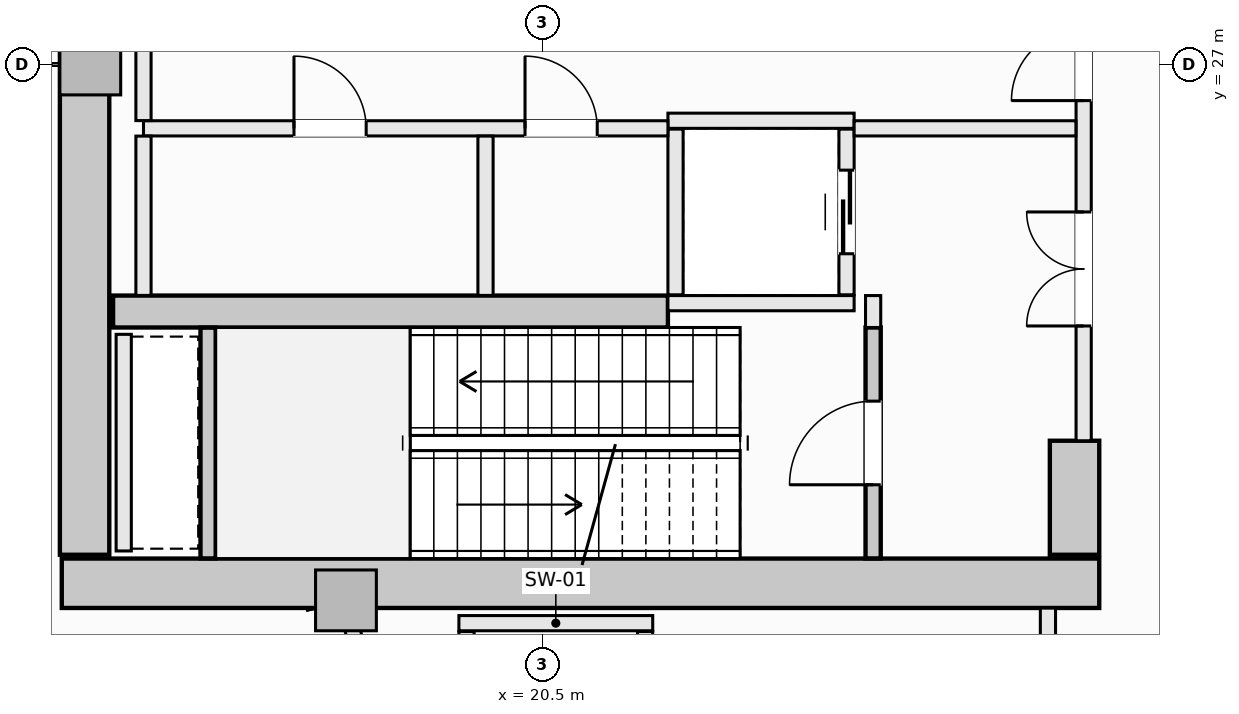
"""IFC4 building model, lengths in metres.
Left out: names, types, materials, properties, quantities, classifications, styles, units other than length and angle.
Written with IfcOpenShell. Run it as: python <this file> out.ifc"""

import sys

from ifc_helpers import new_model, si_unit, direction, frame, frame_2d, origin, origin_2d, place, context, subcontext, project, spatial, rectangle, extrude, element, fill, save


model = new_model("IFC4")
c1 = context("Model", 3, precision=1e-05, world=origin(), true_north=direction((0.0, 1.0)))
c2 = subcontext(c1, "Body", "Model", "MODEL_VIEW")
j1 = project(units=[si_unit("LENGTHUNIT", "METRE"), si_unit("PLANEANGLEUNIT", "RADIAN")], contexts=[c1])
p1 = place(None, origin())
s1 = spatial("IfcSite", under=j1, at=p1, CompositionType="ELEMENT")
p2 = place(p1, origin())
s2 = spatial("IfcBuilding", under=s1, at=p2, CompositionType="ELEMENT")
p3 = place(p2, frame((0.0, 0.0, 186.9)))
s3 = spatial("IfcBuildingStorey", under=s2, at=p3, CompositionType="ELEMENT", Elevation=186.9)
p4 = place(p3, frame((14.175, 20.175, -0.32), z_axis=(0.0, 0.0, 1.0), x_axis=(1.0, 0.0, 0.0)))
e1 = element("IfcWall", 1, at=p4, inside=s3, PredefinedType="SHEAR", context=c2, shape_type="SweptSolid", body=[
    extrude(rectangle(XDim=13.65, YDim=0.65, at=frame_2d((6.825, 0.0))), origin(), (0.0, 0.0, 1.0), 5.04),
])
p5 = place(p3, frame((14.475, 20.55, -0.32), z_axis=(0.0, 0.0, 1.0), x_axis=(0.0, 1.0, 0.0)))
e2 = element("IfcWall", 2, at=p5, inside=s3, PredefinedType="SHEAR", context=c2, shape_type="SweptSolid", body=[
    extrude(rectangle(XDim=12.9, YDim=0.65, at=frame_2d((6.45, 0.0))), origin(), (0.0, 0.0, 1.0), 5.04),
])
p6 = place(p3, frame((27.5, 20.55, -0.32), z_axis=(0.0, 0.0, 1.0), x_axis=(0.0, 1.0, 0.0)))
e3 = element("IfcWall", 3, at=p6, inside=s3, PredefinedType="SHEAR", context=c2, shape_type="SweptSolid", body=[
    extrude(rectangle(XDim=1.5, YDim=0.65, at=frame_2d((0.75, 0.0))), origin(), (0.0, 0.0, 1.0), 5.04),
])
p7 = place(p3, frame((14.85, 23.75, -0.32), z_axis=(0.0, 0.0, 1.0), x_axis=(1.0, 0.0, 0.0)))
e4 = element("IfcWall", 4, at=p7, inside=s3, PredefinedType="SHEAR", context=c2, shape_type="SweptSolid", body=[
    extrude(rectangle(XDim=7.3, YDim=0.42, at=frame_2d((3.65, 0.0))), origin(), (0.0, 0.0, 1.0), 5.04),
])
for number, where, z_axis, x_axis in (
    (5, (14.55, 27.0, -0.32), (0.0, 0.0, 1.0), (1.0, 0.0, 0.0)),
    (6, (17.914, 19.95, -0.32), (0.0, 0.0, 1.0), (1.0, 0.0, 0.0)),
):
    element("IfcColumn", number, at=place(p3, frame(where, z_axis=z_axis, x_axis=x_axis)), inside=s3, PredefinedType="PILASTER", context=c2, shape_type="SweptSolid", body=[
        extrude(rectangle(XDim=0.8, YDim=0.8, at=origin_2d()), origin(), (0.0, 0.0, 1.0), 5.04),
    ])
p8 = place(p3, frame((24.85, 20.502, -0.32), z_axis=(0.0, 0.0, 1.0), x_axis=(0.0, 1.0, 0.0)))
e7 = element("IfcWall", 7, at=p8, inside=s3, PredefinedType="SHEAR", context=c2, shape_type="SweptSolid", body=[
    extrude(rectangle(XDim=3.038, YDim=0.2, at=frame_2d((1.519, 0.0))), origin(), (0.0, 0.0, 1.0), 5.04),
])
p9 = place(p8, frame((0.969, 0.0, 0.32)))
e8 = element("IfcOpeningElement", 8, at=p9, cuts=e7, PredefinedType="OPENING", context=c2, shape_type="SweptSolid", body=[
    extrude(rectangle(XDim=1.1, YDim=2.15, at=frame_2d((0.55, 1.075))), frame((0.0, 0.11, 0.0), z_axis=(0.0, -1.0, 0.0), x_axis=(1.0, 0.0, 0.0)), (0.0, 0.0, 1.0), 0.22),
])
p10 = place(p3, frame((16.1, 20.502, -0.32), z_axis=(0.0, 0.0, 1.0), x_axis=(0.0, 1.0, 0.0)))
e9 = element("IfcWall", 9, at=p10, inside=s3, PredefinedType="SHEAR", context=c2, shape_type="SweptSolid", body=[
    extrude(rectangle(XDim=3.036, YDim=0.2, at=frame_2d((1.518, 0.0))), origin(), (0.0, 0.0, 1.0), 5.04),
])
for number, where, z_axis, x_axis in (
    (10, (22.15, 26.26, 0.0), (0.0, 0.0, 1.0), (1.0, 0.0, 0.0)),
    (11, (22.15, 23.86, 0.0), (0.0, 0.0, 1.0), (1.0, 0.0, 0.0)),
):
    element("IfcWall", number, at=place(p3, frame(where, z_axis=z_axis, x_axis=x_axis)), inside=s3, PredefinedType="SOLIDWALL", context=c2, shape_type="SweptSolid", body=[
        extrude(rectangle(XDim=2.45, YDim=0.2, at=frame_2d((1.225, 0.0))), origin(), (0.0, 0.0, 1.0), 4.72),
    ])
p11 = place(p3, frame((22.25, 23.97, 0.0), z_axis=(0.0, 0.0, 1.0), x_axis=(0.0, 1.0, 0.0)))
e12 = element("IfcWall", 12, at=p11, inside=s3, PredefinedType="SOLIDWALL", context=c2, shape_type="SweptSolid", body=[
    extrude(rectangle(XDim=2.18, YDim=0.2, at=frame_2d((1.09, 0.0))), origin(), (0.0, 0.0, 1.0), 4.72),
])
p12 = place(p3, frame((24.5, 23.97, 0.0), z_axis=(0.0, 0.0, 1.0), x_axis=(0.0, 1.0, 0.0)))
e13 = element("IfcWall", 13, at=p12, inside=s3, PredefinedType="SOLIDWALL", context=c2, shape_type="SweptSolid", body=[
    extrude(rectangle(XDim=2.18, YDim=0.2, at=frame_2d((1.09, 0.0))), origin(), (0.0, 0.0, 1.0), 4.72),
])
p13 = place(p12, frame((0.54, 0.0, 0.0)))
e14 = element("IfcOpeningElement", 14, at=p13, cuts=e13, PredefinedType="OPENING", context=c2, shape_type="SweptSolid", body=[
    extrude(rectangle(XDim=1.1, YDim=2.2, at=frame_2d((0.55, 1.1))), frame((0.0, 0.11, 0.0), z_axis=(0.0, -1.0, 0.0), x_axis=(1.0, 0.0, 0.0)), (0.0, 0.0, 1.0), 0.22),
])
p14 = place(p3, frame((19.4, 19.65, 0.0), z_axis=(0.0, 0.0, 1.0), x_axis=(1.0, 0.0, 0.0)))
e15 = element("IfcWall", 15, at=p14, inside=s3, PredefinedType="SOLIDWALL", context=c2, shape_type="SweptSolid", body=[
    extrude(rectangle(XDim=2.55, YDim=0.2, at=frame_2d((1.275, 0.0))), origin(), (0.0, 0.0, 1.0), 4.72),
])
for number, where, z_axis, x_axis in (
    (16, (19.5, 17.01, 0.0), (0.0, 0.0, 1.0), (0.0, 1.0, 0.0)),
    (17, (21.85, 17.01, 0.0), (0.0, 0.0, 1.0), (0.0, 1.0, 0.0)),
):
    element("IfcWall", number, at=place(p3, frame(where, z_axis=z_axis, x_axis=x_axis)), inside=s3, PredefinedType="SOLIDWALL", context=c2, shape_type="SweptSolid", body=[
        extrude(rectangle(XDim=2.53, YDim=0.2, at=frame_2d((1.265, 0.0))), origin(), (0.0, 0.0, 1.0), 4.72),
    ])
p15 = place(p3, frame((14.99, 20.6, 0.0), z_axis=(0.0, 0.0, 1.0), x_axis=(0.0, 1.0, 0.0)))
e18 = element("IfcWall", 18, at=p15, inside=s3, PredefinedType="SOLIDWALL", context=c2, shape_type="SweptSolid", body=[
    extrude(rectangle(XDim=2.85, YDim=0.2, at=frame_2d((1.425, 0.0))), origin(), (0.0, 0.0, 1.0), 4.72),
])
p16 = place(p3, frame((24.85, 23.54, 0.0), z_axis=(0.0, 0.0, 1.0), x_axis=(0.0, 1.0, 0.0)))
e19 = element("IfcWall", 19, at=p16, inside=s3, PredefinedType="SOLIDWALL", context=c2, shape_type="SweptSolid", body=[
    extrude(rectangle(XDim=0.42, YDim=0.2, at=frame_2d((0.21, 0.0))), origin(), (0.0, 0.0, 1.0), 4.72),
])
p17 = place(p3, frame((27.62, 22.05, 0.0), z_axis=(0.0, 0.0, 1.0), x_axis=(0.0, 1.0, 0.0)))
e20 = element("IfcWall", 20, at=p17, inside=s3, PredefinedType="SOLIDWALL", context=c2, shape_type="SweptSolid", body=[
    extrude(rectangle(XDim=9.9, YDim=0.2, at=frame_2d((4.95, 0.0))), origin(), (0.0, 0.0, 1.0), 3.812),
])
p18 = place(p17, frame((4.475, 0.0, 0.0)))
e21 = element("IfcOpeningElement", 21, at=p18, cuts=e20, PredefinedType="OPENING", context=c2, shape_type="SweptSolid", body=[
    extrude(rectangle(XDim=0.95, YDim=2.1, at=frame_2d((0.475, 1.05))), frame((0.0, 0.11, 0.0), z_axis=(0.0, -1.0, 0.0), x_axis=(1.0, 0.0, 0.0)), (0.0, 0.0, 1.0), 0.22),
])
p19 = place(p17, frame((6.89, 0.0, 0.0)))
e22 = element("IfcOpeningElement", 22, at=p19, cuts=e20, PredefinedType="OPENING", context=c2, shape_type="SweptSolid", body=[
    extrude(rectangle(XDim=1.5, YDim=2.2, at=frame_2d((0.75, 1.1))), frame((0.0, 0.11, 0.0), z_axis=(0.0, -1.0, 0.0), x_axis=(1.0, 0.0, 0.0)), (0.0, 0.0, 1.0), 0.22),
])
p20 = place(p17, frame((1.51, 0.0, 0.0)))
e23 = element("IfcOpeningElement", 23, at=p20, cuts=e20, PredefinedType="OPENING", context=c2, shape_type="SweptSolid", body=[
    extrude(rectangle(XDim=1.5, YDim=2.2, at=frame_2d((0.75, 1.1))), frame((0.0, 0.11, 0.0), z_axis=(0.0, -1.0, 0.0), x_axis=(1.0, 0.0, 0.0)), (0.0, 0.0, 1.0), 0.22),
])
p21 = place(p3, frame((15.25, 26.16, 0.0), z_axis=(0.0, 0.0, 1.0), x_axis=(1.0, 0.0, 0.0)))
e24 = element("IfcWall", 24, at=p21, inside=s3, PredefinedType="SOLIDWALL", context=c2, shape_type="SweptSolid", body=[
    extrude(rectangle(XDim=6.9, YDim=0.2, at=frame_2d((3.45, 0.0))), origin(), (0.0, 0.0, 1.0), 4.72),
])
p22 = place(p21, frame((5.02, 0.0, 0.0)))
e25 = element("IfcOpeningElement", 25, at=p22, cuts=e24, PredefinedType="OPENING", context=c2, shape_type="SweptSolid", body=[
    extrude(rectangle(XDim=0.95, YDim=2.1, at=frame_2d((0.475, 1.05))), frame((0.0, 0.11, 0.0), z_axis=(0.0, -1.0, 0.0), x_axis=(1.0, 0.0, 0.0)), (0.0, 0.0, 1.0), 0.22),
])
p23 = place(p21, frame((1.98, 0.0, 0.0)))
e26 = element("IfcOpeningElement", 26, at=p23, cuts=e24, PredefinedType="OPENING", context=c2, shape_type="SweptSolid", body=[
    extrude(rectangle(XDim=0.95, YDim=2.1, at=frame_2d((0.475, 1.05))), frame((0.0, 0.11, 0.0), z_axis=(0.0, -1.0, 0.0), x_axis=(1.0, 0.0, 0.0)), (0.0, 0.0, 1.0), 0.22),
])
p24 = place(p3, frame((24.6, 26.16, 0.0), z_axis=(0.0, 0.0, 1.0), x_axis=(1.0, 0.0, 0.0)))
e27 = element("IfcWall", 27, at=p24, inside=s3, PredefinedType="SOLIDWALL", context=c2, shape_type="SweptSolid", body=[
    extrude(rectangle(XDim=2.918, YDim=0.2, at=frame_2d((1.459, 0.0))), origin(), (0.0, 0.0, 1.0), 4.72),
])
p25 = place(p3, frame((15.25, 23.962, 0.0), z_axis=(0.0, 0.0, 1.0), x_axis=(0.0, 1.0, 0.0)))
e28 = element("IfcWall", 28, at=p25, inside=s3, PredefinedType="SOLIDWALL", context=c2, shape_type="SweptSolid", body=[
    extrude(rectangle(XDim=2.096, YDim=0.2, at=frame_2d((1.048, 0.0))), origin(), (0.0, 0.0, 1.0), 4.72),
])
p26 = place(p3, frame((15.25, 26.262, 0.0), z_axis=(0.0, 0.0, 1.0), x_axis=(0.0, 1.0, 0.0)))
e29 = element("IfcWall", 29, at=p26, inside=s3, PredefinedType="SOLIDWALL", context=c2, shape_type="SweptSolid", body=[
    extrude(rectangle(XDim=1.476, YDim=0.2, at=frame_2d((0.738, 0.0))), origin(), (0.0, 0.0, 1.0), 4.72),
])
p27 = place(p3, frame((19.75, 23.962, 0.0), z_axis=(0.0, 0.0, 1.0), x_axis=(0.0, 1.0, 0.0)))
e30 = element("IfcWall", 30, at=p27, inside=s3, PredefinedType="SOLIDWALL", context=c2, shape_type="SweptSolid", body=[
    extrude(rectangle(XDim=2.096, YDim=0.2, at=frame_2d((1.048, 0.0))), origin(), (0.0, 0.0, 1.0), 4.72),
])
p28 = place(p3, frame((27.15, 14.8, 0.0), z_axis=(0.0, 0.0, 1.0), x_axis=(0.0, 1.0, 0.0)))
e31 = element("IfcWall", 31, at=p28, inside=s3, PredefinedType="SOLIDWALL", context=c2, shape_type="SweptSolid", body=[
    extrude(rectangle(XDim=5.048, YDim=0.2, at=frame_2d((2.524, 0.0))), origin(), (0.0, 0.0, 1.0), 4.72),
])
p29 = place(p3, frame((17.937, 19.848, 0.0), z_axis=(0.0, 0.0, 1.0), x_axis=(0.221752397237, -0.97510300703, 0.0)))
e32 = element("IfcWall", 32, at=p29, inside=s3, PredefinedType="SOLIDWALL", context=c2, shape_type="SweptSolid", body=[
    extrude(rectangle(XDim=1.045, YDim=0.2, at=frame_2d((0.522, 0.0))), origin(), (0.0, 0.0, 1.0), 4.095),
])
p30 = place(p9, origin())
e33 = element("IfcDoor", 33, at=p30, inside=s3, OperationType="SINGLE_SWING_LEFT", PredefinedType="DOOR", context=c2, shape_type="SweptSolid", body=[
    extrude(rectangle(XDim=1.1, YDim=2.15, at=frame_2d((0.55, 1.075))), frame((0.0, 0.025, 0.0), z_axis=(0.0, -1.0, 0.0), x_axis=(1.0, 0.0, 0.0)), (0.0, 0.0, 1.0), 0.05),
])
fill(e8, e33)
p31 = place(p13, origin())
e34 = element("IfcDoor", 34, at=p31, inside=s3, OperationType="SLIDING_TO_LEFT", PredefinedType="DOOR", context=c2, shape_type="SweptSolid", body=[
    extrude(rectangle(XDim=1.1, YDim=2.2, at=frame_2d((0.55, 1.1))), frame((0.0, 0.025, 0.0), z_axis=(0.0, -1.0, 0.0), x_axis=(1.0, 0.0, 0.0)), (0.0, 0.0, 1.0), 0.05),
])
fill(e14, e34)
p32 = place(p18, origin())
e35 = element("IfcDoor", 35, at=p32, inside=s3, OperationType="SINGLE_SWING_LEFT", PredefinedType="DOOR", context=c2, shape_type="SweptSolid", body=[
    extrude(rectangle(XDim=0.95, YDim=2.1, at=frame_2d((0.475, 1.05))), frame((0.0, 0.025, 0.0), z_axis=(0.0, -1.0, 0.0), x_axis=(1.0, 0.0, 0.0)), (0.0, 0.0, 1.0), 0.05),
])
fill(e21, e35)
p33 = place(p20, origin())
e36 = element("IfcDoor", 36, at=p33, inside=s3, OperationType="DOUBLE_DOOR_SINGLE_SWING", PredefinedType="DOOR", context=c2, shape_type="SweptSolid", body=[
    extrude(rectangle(XDim=1.5, YDim=2.2, at=frame_2d((0.75, 1.1))), frame((0.0, 0.025, 0.0), z_axis=(0.0, -1.0, 0.0), x_axis=(1.0, 0.0, 0.0)), (0.0, 0.0, 1.0), 0.05),
])
fill(e23, e36)
p34 = place(p22, origin())
e37 = element("IfcDoor", 37, at=p34, inside=s3, OperationType="SINGLE_SWING_LEFT", PredefinedType="DOOR", context=c2, shape_type="SweptSolid", body=[
    extrude(rectangle(XDim=0.95, YDim=2.1, at=frame_2d((0.475, 1.05))), frame((0.0, 0.025, 0.0), z_axis=(0.0, -1.0, 0.0), x_axis=(1.0, 0.0, 0.0)), (0.0, 0.0, 1.0), 0.05),
])
fill(e25, e37)
p35 = place(p23, origin())
e38 = element("IfcDoor", 38, at=p35, inside=s3, OperationType="SINGLE_SWING_LEFT", PredefinedType="DOOR", context=c2, shape_type="SweptSolid", body=[
    extrude(rectangle(XDim=0.95, YDim=2.1, at=frame_2d((0.475, 1.05))), frame((0.0, 0.025, 0.0), z_axis=(0.0, -1.0, 0.0), x_axis=(1.0, 0.0, 0.0)), (0.0, 0.0, 1.0), 0.05),
])
fill(e26, e38)
save(model, sys.argv[1])
